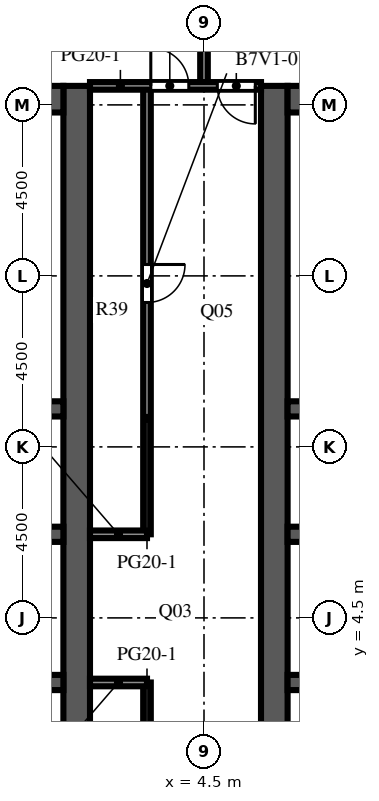
"""IFC4 building model, lengths in metres.
Left out: names, types, materials, properties, quantities, classifications, styles, units other than length and angle.
Written with IfcOpenShell. Run it as: python <this file> out.ifc"""

import sys

from ifc_helpers import new_model, si_unit, direction, frame, frame_2d, origin, place, context, subcontext, project, spatial, rectangle, extrude, element, fill, save


model = new_model("IFC4")
c1 = context("Model", 3, precision=1e-05, world=origin(), true_north=direction((0.0, 1.0)))
c2 = subcontext(c1, "Body", "Model", "MODEL_VIEW")
j1 = project(units=[si_unit("LENGTHUNIT", "METRE"), si_unit("PLANEANGLEUNIT", "RADIAN")], contexts=[c1])
p1 = place(None, origin())
s1 = spatial("IfcSite", under=j1, at=p1, CompositionType="ELEMENT")
p2 = place(p1, origin())
s2 = spatial("IfcBuilding", under=s1, at=p2, CompositionType="ELEMENT")
p3 = place(p2, frame((0.0, 0.0, 252.1)))
s3 = spatial("IfcBuildingStorey", under=s2, at=p3, CompositionType="ELEMENT", Elevation=252.1)
p4 = place(p3, frame((1.15, -9.0, 0.0), z_axis=(0.0, 0.0, 1.0), x_axis=(0.0, 1.0, 0.0)))
e1 = element("IfcWall", 1, at=p4, inside=s3, PredefinedType="SHEAR", context=c2, shape_type="SweptSolid", body=[
    extrude(rectangle(XDim=27.5, YDim=0.7, at=frame_2d((13.75, 0.0))), origin(), (0.0, 0.0, 1.0), 4.1),
])
p5 = place(p4, frame((12.55, 0.0, 0.0)))
e2 = element("IfcOpeningElement", 2, at=p5, cuts=e1, PredefinedType="OPENING", context=c2, shape_type="SweptSolid", body=[
    extrude(rectangle(XDim=2.4, YDim=2.4, at=frame_2d((1.2, 1.2))), frame((0.0, 0.36, 0.0), z_axis=(0.0, -1.0, 0.0), x_axis=(1.0, 0.0, 0.0)), (0.0, 0.0, 1.0), 0.72),
])
p6 = place(p4, frame((3.9, 0.0, 0.0)))
e3 = element("IfcOpeningElement", 3, at=p6, cuts=e1, PredefinedType="OPENING", context=c2, shape_type="SweptSolid", body=[
    extrude(rectangle(XDim=1.2, YDim=2.1, at=frame_2d((0.6, 1.05))), frame((0.0, 0.36, 0.0), z_axis=(0.0, -1.0, 0.0), x_axis=(1.0, 0.0, 0.0)), (0.0, 0.0, 1.0), 0.72),
])
p7 = place(p4, frame((22.4, 0.0, 0.0)))
e4 = element("IfcOpeningElement", 4, at=p7, cuts=e1, PredefinedType="OPENING", context=c2, shape_type="SweptSolid", body=[
    extrude(rectangle(XDim=1.2, YDim=2.1, at=frame_2d((0.6, 1.05))), frame((0.0, 0.36, 0.0), z_axis=(0.0, -1.0, 0.0), x_axis=(1.0, 0.0, 0.0)), (0.0, 0.0, 1.0), 0.72),
])
p8 = place(p3, frame((-9.8, 18.15, 0.0), z_axis=(0.0, 0.0, 1.0), x_axis=(1.0, 0.0, 0.0)))
e5 = element("IfcWall", 5, at=p8, inside=s3, PredefinedType="SHEAR", context=c2, shape_type="SweptSolid", body=[
    extrude(rectangle(XDim=10.6, YDim=0.7, at=frame_2d((5.3, 0.0))), origin(), (0.0, 0.0, 1.0), 4.1),
])
p9 = place(p3, frame((-9.8, 2.8, 0.0), z_axis=(0.0, 0.0, 1.0), x_axis=(1.0, 0.0, 0.0)))
e6 = element("IfcWall", 6, at=p9, inside=s3, PredefinedType="SHEAR", context=c2, shape_type="SweptSolid", body=[
    extrude(rectangle(XDim=10.6, YDim=0.4, at=frame_2d((5.3, 0.0))), origin(), (0.0, 0.0, 1.0), 4.1),
])
p10 = place(p9, frame((0.688, 0.0, 0.0)))
e7 = element("IfcOpeningElement", 7, at=p10, cuts=e6, PredefinedType="OPENING", context=c2, shape_type="SweptSolid", body=[
    extrude(rectangle(XDim=1.1, YDim=2.1, at=frame_2d((0.55, 1.05))), frame((0.0, 0.21, 0.0), z_axis=(0.0, -1.0, 0.0), x_axis=(1.0, 0.0, 0.0)), (0.0, 0.0, 1.0), 0.42),
])
p11 = place(p9, frame((3.438, 0.0, 0.0)))
e8 = element("IfcOpeningElement", 8, at=p11, cuts=e6, PredefinedType="OPENING", context=c2, shape_type="SweptSolid", body=[
    extrude(rectangle(XDim=1.1, YDim=2.1, at=frame_2d((0.55, 1.05))), frame((0.0, 0.21, 0.0), z_axis=(0.0, -1.0, 0.0), x_axis=(1.0, 0.0, 0.0)), (0.0, 0.0, 1.0), 0.42),
])
p12 = place(p9, frame((6.113, 0.0, 0.0)))
e9 = element("IfcOpeningElement", 9, at=p12, cuts=e6, PredefinedType="OPENING", context=c2, shape_type="SweptSolid", body=[
    extrude(rectangle(XDim=1.0, YDim=2.1, at=frame_2d((0.5, 1.05))), frame((0.0, 0.21, 0.0), z_axis=(0.0, -1.0, 0.0), x_axis=(1.0, 0.0, 0.0)), (0.0, 0.0, 1.0), 0.42),
])
p13 = place(p9, frame((8.863, 0.0, 0.0)))
e10 = element("IfcOpeningElement", 10, at=p13, cuts=e6, PredefinedType="OPENING", context=c2, shape_type="SweptSolid", body=[
    extrude(rectangle(XDim=1.0, YDim=2.1, at=frame_2d((0.5, 1.05))), frame((0.0, 0.21, 0.0), z_axis=(0.0, -1.0, 0.0), x_axis=(1.0, 0.0, 0.0)), (0.0, 0.0, 1.0), 0.42),
])
p14 = place(p3, frame((-9.8, 6.7, 0.0), z_axis=(0.0, 0.0, 1.0), x_axis=(1.0, 0.0, 0.0)))
e11 = element("IfcWall", 11, at=p14, inside=s3, PredefinedType="SHEAR", context=c2, shape_type="SweptSolid", body=[
    extrude(rectangle(XDim=10.6, YDim=0.4, at=frame_2d((5.3, 0.0))), origin(), (0.0, 0.0, 1.0), 4.1),
])
p15 = place(p14, frame((3.438, 0.0, 0.0)))
e12 = element("IfcOpeningElement", 12, at=p15, cuts=e11, PredefinedType="OPENING", context=c2, shape_type="SweptSolid", body=[
    extrude(rectangle(XDim=1.1, YDim=2.1, at=frame_2d((0.55, 1.05))), frame((0.0, 0.21, 0.0), z_axis=(0.0, -1.0, 0.0), x_axis=(1.0, 0.0, 0.0)), (0.0, 0.0, 1.0), 0.42),
])
p16 = place(p14, frame((6.062, 0.0, 0.0)))
e13 = element("IfcOpeningElement", 13, at=p16, cuts=e11, PredefinedType="OPENING", context=c2, shape_type="SweptSolid", body=[
    extrude(rectangle(XDim=1.1, YDim=2.1, at=frame_2d((0.55, 1.05))), frame((0.0, 0.21, 0.0), z_axis=(0.0, -1.0, 0.0), x_axis=(1.0, 0.0, 0.0)), (0.0, 0.0, 1.0), 0.42),
])
p17 = place(p14, frame((8.812, 0.0, 0.0)))
e14 = element("IfcOpeningElement", 14, at=p17, cuts=e11, PredefinedType="OPENING", context=c2, shape_type="SweptSolid", body=[
    extrude(rectangle(XDim=1.1, YDim=2.1, at=frame_2d((0.55, 1.05))), frame((0.0, 0.21, 0.0), z_axis=(0.0, -1.0, 0.0), x_axis=(1.0, 0.0, 0.0)), (0.0, 0.0, 1.0), 0.42),
])
p18 = place(p14, frame((0.738, 0.0, 0.0)))
e15 = element("IfcOpeningElement", 15, at=p18, cuts=e11, PredefinedType="OPENING", context=c2, shape_type="SweptSolid", body=[
    extrude(rectangle(XDim=1.0, YDim=2.1, at=frame_2d((0.5, 1.05))), frame((0.0, 0.21, 0.0), z_axis=(0.0, -1.0, 0.0), x_axis=(1.0, 0.0, 0.0)), (0.0, 0.0, 1.0), 0.42),
])
p19 = place(p3, frame((-9.8, 10.0, 0.0), z_axis=(0.0, 0.0, 1.0), x_axis=(1.0, 0.0, 0.0)))
e16 = element("IfcWall", 16, at=p19, inside=s3, PredefinedType="SHEAR", context=c2, shape_type="SweptSolid", body=[
    extrude(rectangle(XDim=10.6, YDim=0.4, at=frame_2d((5.3, 0.0))), origin(), (0.0, 0.0, 1.0), 4.1),
])
p20 = place(p3, frame((6.35, -9.0, 0.0), z_axis=(0.0, 0.0, 1.0), x_axis=(0.0, 1.0, 0.0)))
e17 = element("IfcWall", 17, at=p20, inside=s3, PredefinedType="SHEAR", context=c2, shape_type="SweptSolid", body=[
    extrude(rectangle(XDim=27.5, YDim=0.7, at=frame_2d((13.75, 0.0))), origin(), (0.0, 0.0, 1.0), 4.1),
])
p21 = place(p20, frame((12.55, 0.0, 0.0)))
e18 = element("IfcOpeningElement", 18, at=p21, cuts=e17, PredefinedType="OPENING", context=c2, shape_type="SweptSolid", body=[
    extrude(rectangle(XDim=2.4, YDim=2.4, at=frame_2d((1.2, 1.2))), frame((0.0, 0.36, 0.0), z_axis=(0.0, -1.0, 0.0), x_axis=(1.0, 0.0, 0.0)), (0.0, 0.0, 1.0), 0.72),
])
p22 = place(p20, frame((3.9, 0.0, 0.0)))
e19 = element("IfcOpeningElement", 19, at=p22, cuts=e17, PredefinedType="OPENING", context=c2, shape_type="SweptSolid", body=[
    extrude(rectangle(XDim=1.2, YDim=2.1, at=frame_2d((0.6, 1.05))), frame((0.0, 0.36, 0.0), z_axis=(0.0, -1.0, 0.0), x_axis=(1.0, 0.0, 0.0)), (0.0, 0.0, 1.0), 0.72),
])
p23 = place(p20, frame((22.4, 0.0, 0.0)))
e20 = element("IfcOpeningElement", 20, at=p23, cuts=e17, PredefinedType="OPENING", context=c2, shape_type="SweptSolid", body=[
    extrude(rectangle(XDim=1.2, YDim=2.1, at=frame_2d((0.6, 1.05))), frame((0.0, 0.36, 0.0), z_axis=(0.0, -1.0, 0.0), x_axis=(1.0, 0.0, 0.0)), (0.0, 0.0, 1.0), 0.72),
])
p24 = place(p3, frame((6.7, 18.15, 0.0), z_axis=(0.0, 0.0, 1.0), x_axis=(1.0, 0.0, 0.0)))
e21 = element("IfcWall", 21, at=p24, inside=s3, PredefinedType="SHEAR", context=c2, shape_type="SweptSolid", body=[
    extrude(rectangle(XDim=10.6, YDim=0.7, at=frame_2d((5.3, 0.0))), origin(), (0.0, 0.0, 1.0), 4.1),
])
p25 = place(p3, frame((6.7, 2.8, 0.0), z_axis=(0.0, 0.0, 1.0), x_axis=(1.0, 0.0, 0.0)))
e22 = element("IfcWall", 22, at=p25, inside=s3, PredefinedType="SHEAR", context=c2, shape_type="SweptSolid", body=[
    extrude(rectangle(XDim=10.6, YDim=0.4, at=frame_2d((5.3, 0.0))), origin(), (0.0, 0.0, 1.0), 4.1),
])
p26 = place(p25, frame((0.688, 0.0, 0.0)))
e23 = element("IfcOpeningElement", 23, at=p26, cuts=e22, PredefinedType="OPENING", context=c2, shape_type="SweptSolid", body=[
    extrude(rectangle(XDim=1.1, YDim=2.1, at=frame_2d((0.55, 1.05))), frame((0.0, 0.21, 0.0), z_axis=(0.0, -1.0, 0.0), x_axis=(1.0, 0.0, 0.0)), (0.0, 0.0, 1.0), 0.42),
])
p27 = place(p25, frame((3.438, 0.0, 0.0)))
e24 = element("IfcOpeningElement", 24, at=p27, cuts=e22, PredefinedType="OPENING", context=c2, shape_type="SweptSolid", body=[
    extrude(rectangle(XDim=1.1, YDim=2.1, at=frame_2d((0.55, 1.05))), frame((0.0, 0.21, 0.0), z_axis=(0.0, -1.0, 0.0), x_axis=(1.0, 0.0, 0.0)), (0.0, 0.0, 1.0), 0.42),
])
p28 = place(p25, frame((6.113, 0.0, 0.0)))
e25 = element("IfcOpeningElement", 25, at=p28, cuts=e22, PredefinedType="OPENING", context=c2, shape_type="SweptSolid", body=[
    extrude(rectangle(XDim=1.0, YDim=2.1, at=frame_2d((0.5, 1.05))), frame((0.0, 0.21, 0.0), z_axis=(0.0, -1.0, 0.0), x_axis=(1.0, 0.0, 0.0)), (0.0, 0.0, 1.0), 0.42),
])
p29 = place(p25, frame((8.863, 0.0, 0.0)))
e26 = element("IfcOpeningElement", 26, at=p29, cuts=e22, PredefinedType="OPENING", context=c2, shape_type="SweptSolid", body=[
    extrude(rectangle(XDim=1.0, YDim=2.1, at=frame_2d((0.5, 1.05))), frame((0.0, 0.21, 0.0), z_axis=(0.0, -1.0, 0.0), x_axis=(1.0, 0.0, 0.0)), (0.0, 0.0, 1.0), 0.42),
])
p30 = place(p3, frame((6.7, 6.7, 0.0), z_axis=(0.0, 0.0, 1.0), x_axis=(1.0, 0.0, 0.0)))
e27 = element("IfcWall", 27, at=p30, inside=s3, PredefinedType="SHEAR", context=c2, shape_type="SweptSolid", body=[
    extrude(rectangle(XDim=10.6, YDim=0.4, at=frame_2d((5.3, 0.0))), origin(), (0.0, 0.0, 1.0), 4.1),
])
p31 = place(p30, frame((3.438, 0.0, 0.0)))
e28 = element("IfcOpeningElement", 28, at=p31, cuts=e27, PredefinedType="OPENING", context=c2, shape_type="SweptSolid", body=[
    extrude(rectangle(XDim=1.1, YDim=2.1, at=frame_2d((0.55, 1.05))), frame((0.0, 0.21, 0.0), z_axis=(0.0, -1.0, 0.0), x_axis=(1.0, 0.0, 0.0)), (0.0, 0.0, 1.0), 0.42),
])
p32 = place(p30, frame((6.062, 0.0, 0.0)))
e29 = element("IfcOpeningElement", 29, at=p32, cuts=e27, PredefinedType="OPENING", context=c2, shape_type="SweptSolid", body=[
    extrude(rectangle(XDim=1.1, YDim=2.1, at=frame_2d((0.55, 1.05))), frame((0.0, 0.21, 0.0), z_axis=(0.0, -1.0, 0.0), x_axis=(1.0, 0.0, 0.0)), (0.0, 0.0, 1.0), 0.42),
])
p33 = place(p30, frame((8.812, 0.0, 0.0)))
e30 = element("IfcOpeningElement", 30, at=p33, cuts=e27, PredefinedType="OPENING", context=c2, shape_type="SweptSolid", body=[
    extrude(rectangle(XDim=1.1, YDim=2.1, at=frame_2d((0.55, 1.05))), frame((0.0, 0.21, 0.0), z_axis=(0.0, -1.0, 0.0), x_axis=(1.0, 0.0, 0.0)), (0.0, 0.0, 1.0), 0.42),
])
p34 = place(p30, frame((0.738, 0.0, 0.0)))
e31 = element("IfcOpeningElement", 31, at=p34, cuts=e27, PredefinedType="OPENING", context=c2, shape_type="SweptSolid", body=[
    extrude(rectangle(XDim=1.0, YDim=2.1, at=frame_2d((0.5, 1.05))), frame((0.0, 0.21, 0.0), z_axis=(0.0, -1.0, 0.0), x_axis=(1.0, 0.0, 0.0)), (0.0, 0.0, 1.0), 0.42),
])
p35 = place(p3, frame((6.7, 10.0, 0.0), z_axis=(0.0, 0.0, 1.0), x_axis=(1.0, 0.0, 0.0)))
e32 = element("IfcWall", 32, at=p35, inside=s3, PredefinedType="SHEAR", context=c2, shape_type="SweptSolid", body=[
    extrude(rectangle(XDim=10.6, YDim=0.4, at=frame_2d((5.3, 0.0))), origin(), (0.0, 0.0, 1.0), 4.1),
])
p36 = place(p3, frame((3.0, -3.5, 0.0), z_axis=(0.0, 0.0, 1.0), x_axis=(0.0, 1.0, 0.0)))
e33 = element("IfcWall", 33, at=p36, inside=s3, PredefinedType="PARTITIONING", context=c2, shape_type="SweptSolid", body=[
    extrude(rectangle(XDim=6.3, YDim=0.2, at=frame_2d((3.15, 0.0))), origin(), (0.0, 0.0, 1.0), 3.65),
])
p37 = place(p36, frame((2.35, 0.0, 0.0)))
e34 = element("IfcOpeningElement", 34, at=p37, cuts=e33, PredefinedType="OPENING", context=c2, shape_type="SweptSolid", body=[
    extrude(rectangle(XDim=1.0, YDim=2.1, at=frame_2d((0.5, 1.05))), frame((0.0, 0.11, 0.0), z_axis=(0.0, -1.0, 0.0), x_axis=(1.0, 0.0, 0.0)), (0.0, 0.0, 1.0), 0.22),
])
p38 = place(p3, frame((3.0, 6.7, 0.0), z_axis=(0.0, 0.0, 1.0), x_axis=(0.0, 1.0, 0.0)))
e35 = element("IfcWall", 35, at=p38, inside=s3, PredefinedType="PARTITIONING", context=c2, shape_type="SweptSolid", body=[
    extrude(rectangle(XDim=11.8, YDim=0.2, at=frame_2d((5.9, 0.0))), origin(), (0.0, 0.0, 1.0), 3.65),
])
p39 = place(p38, frame((6.1, 0.0, 0.0)))
e36 = element("IfcOpeningElement", 36, at=p39, cuts=e35, PredefinedType="OPENING", context=c2, shape_type="SweptSolid", body=[
    extrude(rectangle(XDim=1.0, YDim=2.1, at=frame_2d((0.5, 1.05))), frame((0.0, 0.11, 0.0), z_axis=(0.0, -1.0, 0.0), x_axis=(1.0, 0.0, 0.0)), (0.0, 0.0, 1.0), 0.22),
])
p40 = place(p3, frame((4.5, 18.5, 0.0), z_axis=(0.0, 0.0, 1.0), x_axis=(0.0, 1.0, 0.0)))
e37 = element("IfcWall", 37, at=p40, inside=s3, PredefinedType="PARTITIONING", context=c2, shape_type="SweptSolid", body=[
    extrude(rectangle(XDim=12.6, YDim=0.2, at=frame_2d((6.3, 0.0))), origin(), (0.0, 0.0, 1.0), 3.65),
])
for number, where, z_axis, x_axis in (
    (38, (1.5, 2.8, 0.0), (0.0, 0.0, 1.0), (1.0, 0.0, 0.0)),
    (39, (1.5, 6.7, 0.0), (0.0, 0.0, 1.0), (1.0, 0.0, 0.0)),
):
    element("IfcWall", number, at=place(p3, frame(where, z_axis=z_axis, x_axis=x_axis)), inside=s3, PredefinedType="PARTITIONING", context=c2, shape_type="SweptSolid", body=[
        extrude(rectangle(XDim=1.5, YDim=0.2, at=frame_2d((0.75, 0.0))), origin(), (0.0, 0.0, 1.0), 3.65),
    ])
p41 = place(p3, frame((1.5, 18.5, 0.0), z_axis=(0.0, 0.0, 1.0), x_axis=(1.0, 0.0, 0.0)))
e40 = element("IfcWall", 40, at=p41, inside=s3, PredefinedType="PARTITIONING", context=c2, shape_type="SweptSolid", body=[
    extrude(rectangle(XDim=4.5, YDim=0.2, at=frame_2d((2.25, 0.0))), origin(), (0.0, 0.0, 1.0), 3.65),
])
p42 = place(p41, frame((1.6, 0.0, 0.0)))
e41 = element("IfcOpeningElement", 41, at=p42, cuts=e40, PredefinedType="OPENING", context=c2, shape_type="SweptSolid", body=[
    extrude(rectangle(XDim=1.0, YDim=2.1, at=frame_2d((0.5, 1.05))), frame((0.0, 0.11, 0.0), z_axis=(0.0, -1.0, 0.0), x_axis=(1.0, 0.0, 0.0)), (0.0, 0.0, 1.0), 0.22),
])
p43 = place(p41, frame((3.35, 0.0, 0.0)))
e42 = element("IfcOpeningElement", 42, at=p43, cuts=e40, PredefinedType="OPENING", context=c2, shape_type="SweptSolid", body=[
    extrude(rectangle(XDim=1.0, YDim=2.1, at=frame_2d((0.5, 1.05))), frame((0.0, 0.11, 0.0), z_axis=(0.0, -1.0, 0.0), x_axis=(1.0, 0.0, 0.0)), (0.0, 0.0, 1.0), 0.22),
])
p44 = place(p5, origin())
e43 = element("IfcDoor", 43, at=p44, inside=s3, OperationType="DOUBLE_DOOR_DOUBLE_SWING", PredefinedType="DOOR", context=c2, shape_type="SweptSolid", body=[
    extrude(rectangle(XDim=2.4, YDim=2.4, at=frame_2d((1.2, 1.2))), frame((0.0, 0.025, 0.0), z_axis=(0.0, -1.0, 0.0), x_axis=(1.0, 0.0, 0.0)), (0.0, 0.0, 1.0), 0.05),
])
fill(e2, e43)
p45 = place(p21, origin())
e44 = element("IfcDoor", 44, at=p45, inside=s3, OperationType="DOUBLE_DOOR_DOUBLE_SWING", PredefinedType="DOOR", context=c2, shape_type="SweptSolid", body=[
    extrude(rectangle(XDim=2.4, YDim=2.4, at=frame_2d((1.2, 1.2))), frame((0.0, 0.025, 0.0), z_axis=(0.0, -1.0, 0.0), x_axis=(1.0, 0.0, 0.0)), (0.0, 0.0, 1.0), 0.05),
])
fill(e18, e44)
p46 = place(p7, origin())
e45 = element("IfcDoor", 45, at=p46, inside=s3, OperationType="SINGLE_SWING_LEFT", PredefinedType="DOOR", context=c2, shape_type="SweptSolid", body=[
    extrude(rectangle(XDim=1.2, YDim=2.1, at=frame_2d((0.6, 1.05))), frame((0.0, 0.325, 0.0), z_axis=(0.0, -1.0, 0.0), x_axis=(1.0, 0.0, 0.0)), (0.0, 0.0, 1.0), 0.05),
])
fill(e4, e45)
p47 = place(p23, origin())
e46 = element("IfcDoor", 46, at=p47, inside=s3, OperationType="SINGLE_SWING_RIGHT", PredefinedType="DOOR", context=c2, shape_type="SweptSolid", body=[
    extrude(rectangle(XDim=1.2, YDim=2.1, at=frame_2d((0.6, 1.05))), frame((0.0, -0.275, 0.0), z_axis=(0.0, -1.0, 0.0), x_axis=(1.0, 0.0, 0.0)), (0.0, 0.0, 1.0), 0.05),
])
fill(e20, e46)
p48 = place(p39, origin())
e47 = element("IfcDoor", 47, at=p48, inside=s3, OperationType="SINGLE_SWING_RIGHT", PredefinedType="DOOR", context=c2, shape_type="SweptSolid", body=[
    extrude(rectangle(XDim=1.0, YDim=2.1, at=frame_2d((0.5, 1.05))), frame((0.0, 0.025, 0.0), z_axis=(0.0, -1.0, 0.0), x_axis=(1.0, 0.0, 0.0)), (0.0, 0.0, 1.0), 0.05),
])
fill(e36, e47)
p49 = place(p42, origin())
e48 = element("IfcDoor", 48, at=p49, inside=s3, OperationType="SINGLE_SWING_LEFT", PredefinedType="DOOR", context=c2, shape_type="SweptSolid", body=[
    extrude(rectangle(XDim=1.0, YDim=2.1, at=frame_2d((0.5, 1.05))), frame((0.0, 0.025, 0.0), z_axis=(0.0, -1.0, 0.0), x_axis=(1.0, 0.0, 0.0)), (0.0, 0.0, 1.0), 0.05),
])
fill(e41, e48)
p50 = place(p43, origin())
e49 = element("IfcDoor", 49, at=p50, inside=s3, OperationType="SINGLE_SWING_RIGHT", PredefinedType="DOOR", context=c2, shape_type="SweptSolid", body=[
    extrude(rectangle(XDim=1.0, YDim=2.1, at=frame_2d((0.5, 1.05))), frame((0.0, 0.025, 0.0), z_axis=(0.0, -1.0, 0.0), x_axis=(1.0, 0.0, 0.0)), (0.0, 0.0, 1.0), 0.05),
])
fill(e42, e49)
save(model, sys.argv[1])
